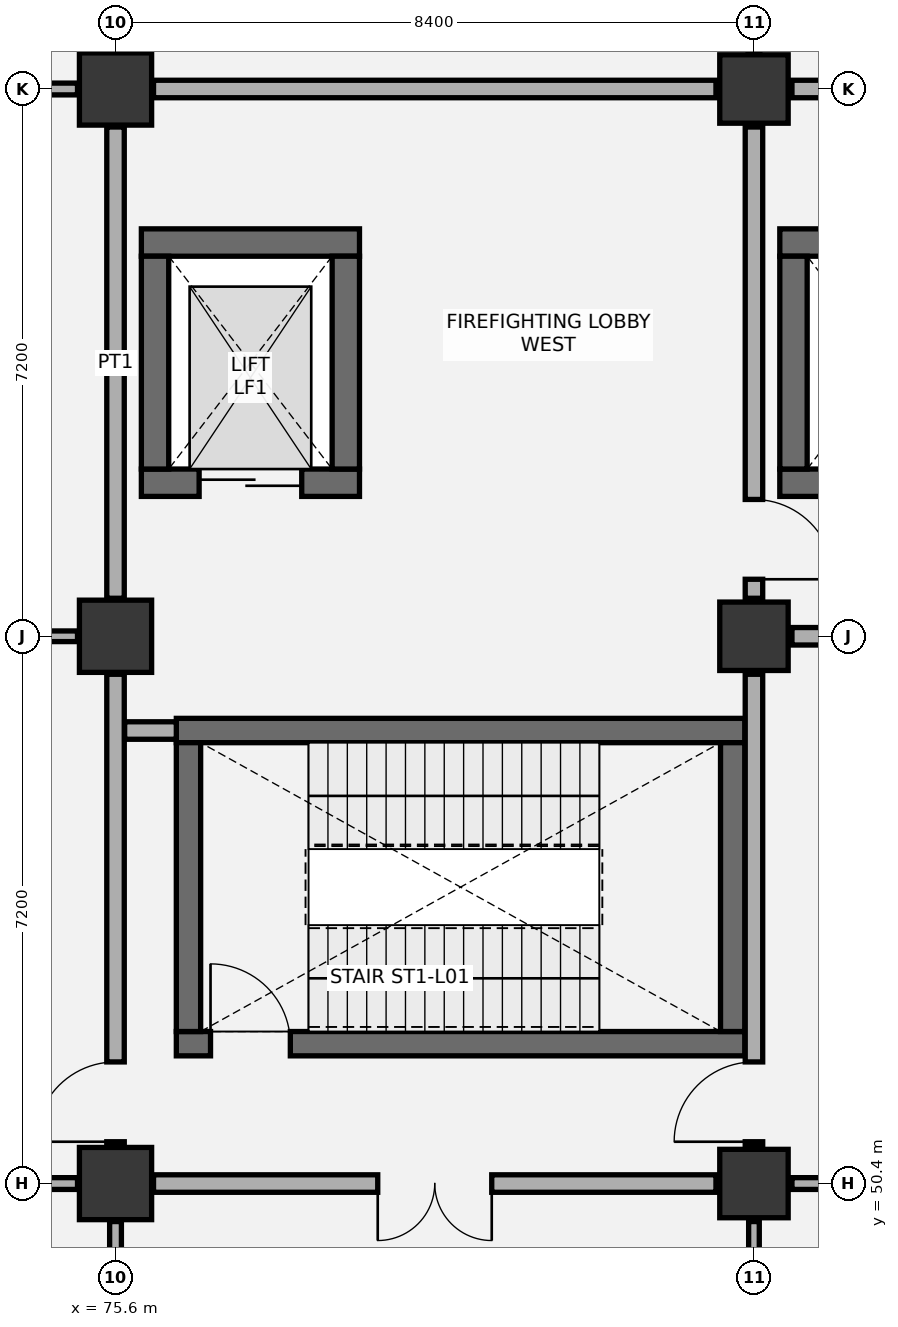
"""IFC4 building model, lengths in metres.
Left out: names, types, materials, properties, quantities, classifications, styles, units other than length and angle.
Written with IfcOpenShell. Run it as: python <this file> out.ifc"""

import sys

from ifc_helpers import new_model, si_unit, direction, frame, frame_2d, origin, origin_2d, place, context, subcontext, project, spatial, rectangle, extrude, element, fill, save


model = new_model("IFC4")
c1 = context("Model", 3, precision=1e-05, world=origin(), true_north=direction((0.0, 1.0)))
c2 = subcontext(c1, "Body", "Model", "MODEL_VIEW")
j1 = project(units=[si_unit("LENGTHUNIT", "METRE"), si_unit("PLANEANGLEUNIT", "RADIAN")], contexts=[c1])
p1 = place(None, origin())
s1 = spatial("IfcSite", under=j1, at=p1, CompositionType="ELEMENT")
p2 = place(p1, origin())
s2 = spatial("IfcBuilding", under=s1, at=p2, CompositionType="ELEMENT")
p3 = place(p2, frame((0.0, 0.0, 6.0)))
s3 = spatial("IfcBuildingStorey", under=s2, at=p3, CompositionType="ELEMENT", Elevation=6.0)
for number, where, z_axis, x_axis in (
    (1, (75.6, 50.4, 0.0), (0.0, 0.0, 1.0), (1.0, 0.0, 0.0)),
    (2, (75.6, 57.6, 0.0), (0.0, 0.0, 1.0), (1.0, 0.0, 0.0)),
    (3, (75.6, 64.8, 0.0), (0.0, 0.0, 1.0), (1.0, 0.0, 0.0)),
):
    element("IfcColumn", number, at=place(p3, frame(where, z_axis=z_axis, x_axis=x_axis)), inside=s3, PredefinedType="COLUMN", context=c2, shape_type="SweptSolid", body=[
        extrude(rectangle(XDim=0.95, YDim=0.95, at=origin_2d()), origin(), (0.0, 0.0, 1.0), 5.4),
    ])
for number, where, z_axis, x_axis in (
    (4, (84.0, 50.4, 0.0), (0.0, 0.0, 1.0), (1.0, 0.0, 0.0)),
    (5, (84.0, 57.6, 0.0), (0.0, 0.0, 1.0), (1.0, 0.0, 0.0)),
    (6, (84.0, 64.8, 0.0), (0.0, 0.0, 1.0), (1.0, 0.0, 0.0)),
):
    element("IfcColumn", number, at=place(p3, frame(where, z_axis=z_axis, x_axis=x_axis)), inside=s3, PredefinedType="COLUMN", context=c2, shape_type="SweptSolid", body=[
        extrude(rectangle(XDim=0.9, YDim=0.9, at=origin_2d()), origin(), (0.0, 0.0, 1.0), 5.4),
    ])
p4 = place(p3, frame((76.4, 52.24, 0.0), z_axis=(0.0, 0.0, 1.0), x_axis=(1.0, 0.0, 0.0)))
e7 = element("IfcWall", 7, at=p4, inside=s3, PredefinedType="SHEAR", context=c2, shape_type="SweptSolid", body=[
    extrude(rectangle(XDim=7.48, YDim=0.32, at=frame_2d((3.74, 0.0))), origin(), (0.0, 0.0, 1.0), 5.075),
])
p5 = place(p4, frame((0.45, 0.0, 0.0)))
e8 = element("IfcOpeningElement", 8, at=p5, cuts=e7, PredefinedType="OPENING", context=c2, shape_type="SweptSolid", body=[
    extrude(rectangle(XDim=1.05, YDim=2.15, at=frame_2d((0.525, 1.075))), frame((0.0, 0.17, 0.0), z_axis=(0.0, -1.0, 0.0), x_axis=(1.0, 0.0, 0.0)), (0.0, 0.0, 1.0), 0.34),
])
p6 = place(p3, frame((76.4, 56.36, 0.0), z_axis=(0.0, 0.0, 1.0), x_axis=(1.0, 0.0, 0.0)))
e9 = element("IfcWall", 9, at=p6, inside=s3, PredefinedType="SHEAR", context=c2, shape_type="SweptSolid", body=[
    extrude(rectangle(XDim=7.48, YDim=0.32, at=frame_2d((3.74, 0.0))), origin(), (0.0, 0.0, 1.0), 5.075),
])
for number, where, z_axis, x_axis in (
    (10, (76.56, 52.4, 0.0), (0.0, 0.0, 1.0), (0.0, 1.0, 0.0)),
    (11, (83.72, 52.4, 0.0), (0.0, 0.0, 1.0), (0.0, 1.0, 0.0)),
):
    element("IfcWall", number, at=place(p3, frame(where, z_axis=z_axis, x_axis=x_axis)), inside=s3, PredefinedType="SHEAR", context=c2, shape_type="SweptSolid", body=[
        extrude(rectangle(XDim=3.8, YDim=0.32, at=frame_2d((1.9, 0.0))), origin(), (0.0, 0.0, 1.0), 5.075),
    ])
p7 = place(p3, frame((75.94, 62.78, 0.0), z_axis=(0.0, 0.0, 1.0), x_axis=(1.0, 0.0, 0.0)))
e12 = element("IfcWall", 12, at=p7, inside=s3, PredefinedType="SHEAR", context=c2, shape_type="SweptSolid", body=[
    extrude(rectangle(XDim=2.87, YDim=0.36, at=frame_2d((1.435, 0.0))), origin(), (0.0, 0.0, 1.0), 5.075),
])
p8 = place(p3, frame((75.94, 59.62, 0.0), z_axis=(0.0, 0.0, 1.0), x_axis=(1.0, 0.0, 0.0)))
e13 = element("IfcWall", 13, at=p8, inside=s3, PredefinedType="SHEAR", context=c2, shape_type="SweptSolid", body=[
    extrude(rectangle(XDim=2.87, YDim=0.36, at=frame_2d((1.435, 0.0))), origin(), (0.0, 0.0, 1.0), 5.075),
])
p9 = place(p8, frame((0.76, 0.0, 0.0)))
e14 = element("IfcOpeningElement", 14, at=p9, cuts=e13, PredefinedType="OPENING", context=c2, shape_type="SweptSolid", body=[
    extrude(rectangle(XDim=1.35, YDim=2.2, at=frame_2d((0.675, 1.1))), frame((0.0, 0.19, 0.0), z_axis=(0.0, -1.0, 0.0), x_axis=(1.0, 0.0, 0.0)), (0.0, 0.0, 1.0), 0.38),
])
for number, where, z_axis, x_axis in (
    (15, (76.12, 59.8, 0.0), (0.0, 0.0, 1.0), (0.0, 1.0, 0.0)),
    (16, (78.63, 59.8, 0.0), (0.0, 0.0, 1.0), (0.0, 1.0, 0.0)),
):
    element("IfcWall", number, at=place(p3, frame(where, z_axis=z_axis, x_axis=x_axis)), inside=s3, PredefinedType="SHEAR", context=c2, shape_type="SweptSolid", body=[
        extrude(rectangle(XDim=2.8, YDim=0.36, at=frame_2d((1.4, 0.0))), origin(), (0.0, 0.0, 1.0), 5.075),
    ])
p10 = place(p3, frame((84.34, 62.78, 0.0), z_axis=(0.0, 0.0, 1.0), x_axis=(1.0, 0.0, 0.0)))
e17 = element("IfcWall", 17, at=p10, inside=s3, PredefinedType="SHEAR", context=c2, shape_type="SweptSolid", body=[
    extrude(rectangle(XDim=7.77, YDim=0.36, at=frame_2d((3.885, 0.0))), origin(), (0.0, 0.0, 1.0), 5.075),
])
p11 = place(p3, frame((84.34, 59.62, 0.0), z_axis=(0.0, 0.0, 1.0), x_axis=(1.0, 0.0, 0.0)))
e18 = element("IfcWall", 18, at=p11, inside=s3, PredefinedType="SHEAR", context=c2, shape_type="SweptSolid", body=[
    extrude(rectangle(XDim=2.66, YDim=0.36, at=frame_2d((1.33, 0.0))), origin(), (0.0, 0.0, 1.0), 5.075),
])
p12 = place(p11, frame((0.78, 0.0, 0.0)))
e19 = element("IfcOpeningElement", 19, at=p12, cuts=e18, PredefinedType="OPENING", context=c2, shape_type="SweptSolid", body=[
    extrude(rectangle(XDim=1.1, YDim=2.15, at=frame_2d((0.55, 1.075))), frame((0.0, 0.19, 0.0), z_axis=(0.0, -1.0, 0.0), x_axis=(1.0, 0.0, 0.0)), (0.0, 0.0, 1.0), 0.38),
])
p13 = place(p3, frame((84.52, 59.8, 0.0), z_axis=(0.0, 0.0, 1.0), x_axis=(0.0, 1.0, 0.0)))
e20 = element("IfcWall", 20, at=p13, inside=s3, PredefinedType="SHEAR", context=c2, shape_type="SweptSolid", body=[
    extrude(rectangle(XDim=2.8, YDim=0.36, at=frame_2d((1.4, 0.0))), origin(), (0.0, 0.0, 1.0), 5.075),
])
p14 = place(p3, frame((75.6, 43.7, 0.0), z_axis=(0.0, 0.0, 1.0), x_axis=(0.0, 1.0, 0.0)))
e21 = element("IfcWall", 21, at=p14, inside=s3, PredefinedType="PARTITIONING", context=c2, shape_type="SweptSolid", body=[
    extrude(rectangle(XDim=6.2, YDim=0.155, at=frame_2d((3.1, 0.0))), origin(), (0.0, 0.0, 1.0), 4.57),
])
p15 = place(p14, frame((2.4, 0.0, 0.0)))
e22 = element("IfcOpeningElement", 22, at=p15, cuts=e21, PredefinedType="OPENING", context=c2, shape_type="SweptSolid", body=[
    extrude(rectangle(XDim=1.4, YDim=2.15, at=frame_2d((0.7, 1.075))), frame((0.0, 0.087, 0.0), z_axis=(0.0, -1.0, 0.0), x_axis=(1.0, 0.0, 0.0)), (0.0, 0.0, 1.0), 0.175),
])
p16 = place(p3, frame((67.7, 50.4, 0.0), z_axis=(0.0, 0.0, 1.0), x_axis=(1.0, 0.0, 0.0)))
e23 = element("IfcWall", 23, at=p16, inside=s3, PredefinedType="PARTITIONING", context=c2, shape_type="SweptSolid", body=[
    extrude(rectangle(XDim=7.4, YDim=0.155, at=frame_2d((3.7, 0.0))), origin(), (0.0, 0.0, 1.0), 4.27),
])
p17 = place(p16, frame((2.85, 0.0, 0.0)))
e24 = element("IfcOpeningElement", 24, at=p17, cuts=e23, PredefinedType="OPENING", context=c2, shape_type="SweptSolid", body=[
    extrude(rectangle(XDim=1.7, YDim=2.25, at=frame_2d((0.85, 1.125))), frame((0.0, 0.087, 0.0), z_axis=(0.0, -1.0, 0.0), x_axis=(1.0, 0.0, 0.0)), (0.0, 0.0, 1.0), 0.175),
])
p18 = place(p3, frame((75.6, 50.9, 0.0), z_axis=(0.0, 0.0, 1.0), x_axis=(0.0, 1.0, 0.0)))
e25 = element("IfcWall", 25, at=p18, inside=s3, PredefinedType="PARTITIONING", context=c2, shape_type="SweptSolid", body=[
    extrude(rectangle(XDim=6.2, YDim=0.23, at=frame_2d((3.1, 0.0))), origin(), (0.0, 0.0, 1.0), 4.32),
])
p19 = place(p18, frame((0.05, 0.0, 0.0)))
e26 = element("IfcOpeningElement", 26, at=p19, cuts=e25, PredefinedType="OPENING", context=c2, shape_type="SweptSolid", body=[
    extrude(rectangle(XDim=1.05, YDim=2.15, at=frame_2d((0.525, 1.075))), frame((0.0, 0.125, 0.0), z_axis=(0.0, -1.0, 0.0), x_axis=(1.0, 0.0, 0.0)), (0.0, 0.0, 1.0), 0.25),
])
p20 = place(p3, frame((67.7, 57.6, 0.0), z_axis=(0.0, 0.0, 1.0), x_axis=(1.0, 0.0, 0.0)))
e27 = element("IfcWall", 27, at=p20, inside=s3, PredefinedType="PARTITIONING", context=c2, shape_type="SweptSolid", body=[
    extrude(rectangle(XDim=7.4, YDim=0.14, at=frame_2d((3.7, 0.0))), origin(), (0.0, 0.0, 1.0), 4.27),
])
p21 = place(p20, frame((2.85, 0.0, 0.0)))
e28 = element("IfcOpeningElement", 28, at=p21, cuts=e27, PredefinedType="OPENING", context=c2, shape_type="SweptSolid", body=[
    extrude(rectangle(XDim=1.7, YDim=2.25, at=frame_2d((0.85, 1.125))), frame((0.0, 0.08, 0.0), z_axis=(0.0, -1.0, 0.0), x_axis=(1.0, 0.0, 0.0)), (0.0, 0.0, 1.0), 0.16),
])
p22 = place(p3, frame((75.6, 58.1, 0.0), z_axis=(0.0, 0.0, 1.0), x_axis=(0.0, 1.0, 0.0)))
e29 = element("IfcWall", 29, at=p22, inside=s3, PredefinedType="PARTITIONING", context=c2, shape_type="SweptSolid", body=[
    extrude(rectangle(XDim=6.2, YDim=0.23, at=frame_2d((3.1, 0.0))), origin(), (0.0, 0.0, 1.0), 4.67),
])
p23 = place(p3, frame((67.7, 64.8, 0.0), z_axis=(0.0, 0.0, 1.0), x_axis=(1.0, 0.0, 0.0)))
e30 = element("IfcWall", 30, at=p23, inside=s3, PredefinedType="PARTITIONING", context=c2, shape_type="SweptSolid", body=[
    extrude(rectangle(XDim=7.4, YDim=0.155, at=frame_2d((3.7, 0.0))), origin(), (0.0, 0.0, 1.0), 4.27),
])
p24 = place(p23, frame((3.0, 0.0, 0.0)))
e31 = element("IfcOpeningElement", 31, at=p24, cuts=e30, PredefinedType="OPENING", context=c2, shape_type="SweptSolid", body=[
    extrude(rectangle(XDim=1.4, YDim=2.15, at=frame_2d((0.7, 1.075))), frame((0.0, 0.087, 0.0), z_axis=(0.0, -1.0, 0.0), x_axis=(1.0, 0.0, 0.0)), (0.0, 0.0, 1.0), 0.175),
])
p25 = place(p3, frame((84.0, 43.7, 0.0), z_axis=(0.0, 0.0, 1.0), x_axis=(0.0, 1.0, 0.0)))
e32 = element("IfcWall", 32, at=p25, inside=s3, PredefinedType="PARTITIONING", context=c2, shape_type="SweptSolid", body=[
    extrude(rectangle(XDim=6.2, YDim=0.14, at=frame_2d((3.1, 0.0))), origin(), (0.0, 0.0, 1.0), 4.32),
])
p26 = place(p25, frame((2.4, 0.0, 0.0)))
e33 = element("IfcOpeningElement", 33, at=p26, cuts=e32, PredefinedType="OPENING", context=c2, shape_type="SweptSolid", body=[
    extrude(rectangle(XDim=1.4, YDim=2.15, at=frame_2d((0.7, 1.075))), frame((0.0, 0.08, 0.0), z_axis=(0.0, -1.0, 0.0), x_axis=(1.0, 0.0, 0.0)), (0.0, 0.0, 1.0), 0.16),
])
p27 = place(p3, frame((76.1, 50.4, 0.0), z_axis=(0.0, 0.0, 1.0), x_axis=(1.0, 0.0, 0.0)))
e34 = element("IfcWall", 34, at=p27, inside=s3, PredefinedType="PARTITIONING", context=c2, shape_type="SweptSolid", body=[
    extrude(rectangle(XDim=7.4, YDim=0.23, at=frame_2d((3.7, 0.0))), origin(), (0.0, 0.0, 1.0), 4.27),
])
p28 = place(p27, frame((2.95, 0.0, 0.0)))
e35 = element("IfcOpeningElement", 35, at=p28, cuts=e34, PredefinedType="OPENING", context=c2, shape_type="SweptSolid", body=[
    extrude(rectangle(XDim=1.5, YDim=2.15, at=frame_2d((0.75, 1.075))), frame((0.0, 0.125, 0.0), z_axis=(0.0, -1.0, 0.0), x_axis=(1.0, 0.0, 0.0)), (0.0, 0.0, 1.0), 0.25),
])
p29 = place(p3, frame((84.0, 50.9, 0.0), z_axis=(0.0, 0.0, 1.0), x_axis=(0.0, 1.0, 0.0)))
e36 = element("IfcWall", 36, at=p29, inside=s3, PredefinedType="PARTITIONING", context=c2, shape_type="SweptSolid", body=[
    extrude(rectangle(XDim=6.2, YDim=0.23, at=frame_2d((3.1, 0.0))), origin(), (0.0, 0.0, 1.0), 4.67),
])
p30 = place(p29, frame((0.05, 0.0, 0.0)))
e37 = element("IfcOpeningElement", 37, at=p30, cuts=e36, PredefinedType="OPENING", context=c2, shape_type="SweptSolid", body=[
    extrude(rectangle(XDim=1.05, YDim=2.15, at=frame_2d((0.525, 1.075))), frame((0.0, 0.125, 0.0), z_axis=(0.0, -1.0, 0.0), x_axis=(1.0, 0.0, 0.0)), (0.0, 0.0, 1.0), 0.25),
])
p31 = place(p3, frame((75.72, 56.36, 0.0), z_axis=(0.0, 0.0, 1.0), x_axis=(1.0, 0.0, 0.0)))
e38 = element("IfcWall", 38, at=p31, inside=s3, PredefinedType="PARTITIONING", context=c2, shape_type="SweptSolid", body=[
    extrude(rectangle(XDim=0.68, YDim=0.23, at=frame_2d((0.34, 0.0))), origin(), (0.0, 0.0, 1.0), 5.075),
])
p32 = place(p3, frame((84.0, 58.1, 0.0), z_axis=(0.0, 0.0, 1.0), x_axis=(0.0, 1.0, 0.0)))
e39 = element("IfcWall", 39, at=p32, inside=s3, PredefinedType="PARTITIONING", context=c2, shape_type="SweptSolid", body=[
    extrude(rectangle(XDim=6.2, YDim=0.23, at=frame_2d((3.1, 0.0))), origin(), (0.0, 0.0, 1.0), 4.32),
])
p33 = place(p32, frame((0.25, 0.0, 0.0)))
e40 = element("IfcOpeningElement", 40, at=p33, cuts=e39, PredefinedType="OPENING", context=c2, shape_type="SweptSolid", body=[
    extrude(rectangle(XDim=1.05, YDim=2.15, at=frame_2d((0.525, 1.075))), frame((0.0, 0.125, 0.0), z_axis=(0.0, -1.0, 0.0), x_axis=(1.0, 0.0, 0.0)), (0.0, 0.0, 1.0), 0.25),
])
p34 = place(p3, frame((76.1, 64.8, 0.0), z_axis=(0.0, 0.0, 1.0), x_axis=(1.0, 0.0, 0.0)))
e41 = element("IfcWall", 41, at=p34, inside=s3, PredefinedType="PARTITIONING", context=c2, shape_type="SweptSolid", body=[
    extrude(rectangle(XDim=7.4, YDim=0.23, at=frame_2d((3.7, 0.0))), origin(), (0.0, 0.0, 1.0), 4.27),
])
p35 = place(p3, frame((84.5, 50.4, 0.0), z_axis=(0.0, 0.0, 1.0), x_axis=(1.0, 0.0, 0.0)))
e42 = element("IfcWall", 42, at=p35, inside=s3, PredefinedType="PARTITIONING", context=c2, shape_type="SweptSolid", body=[
    extrude(rectangle(XDim=7.4, YDim=0.155, at=frame_2d((3.7, 0.0))), origin(), (0.0, 0.0, 1.0), 4.27),
])
p36 = place(p35, frame((3.0, 0.0, 0.0)))
e43 = element("IfcOpeningElement", 43, at=p36, cuts=e42, PredefinedType="OPENING", context=c2, shape_type="SweptSolid", body=[
    extrude(rectangle(XDim=1.4, YDim=2.15, at=frame_2d((0.7, 1.075))), frame((0.0, 0.087, 0.0), z_axis=(0.0, -1.0, 0.0), x_axis=(1.0, 0.0, 0.0)), (0.0, 0.0, 1.0), 0.175),
])
p37 = place(p3, frame((84.5, 57.6, 0.0), z_axis=(0.0, 0.0, 1.0), x_axis=(1.0, 0.0, 0.0)))
e44 = element("IfcWall", 44, at=p37, inside=s3, PredefinedType="PARTITIONING", context=c2, shape_type="SweptSolid", body=[
    extrude(rectangle(XDim=7.4, YDim=0.23, at=frame_2d((3.7, 0.0))), origin(), (0.0, 0.0, 1.0), 4.27),
])
p38 = place(p37, frame((2.95, 0.0, 0.0)))
e45 = element("IfcOpeningElement", 45, at=p38, cuts=e44, PredefinedType="OPENING", context=c2, shape_type="SweptSolid", body=[
    extrude(rectangle(XDim=1.5, YDim=2.15, at=frame_2d((0.75, 1.075))), frame((0.0, 0.125, 0.0), z_axis=(0.0, -1.0, 0.0), x_axis=(1.0, 0.0, 0.0)), (0.0, 0.0, 1.0), 0.25),
])
p39 = place(p3, frame((84.5, 64.8, 0.0), z_axis=(0.0, 0.0, 1.0), x_axis=(1.0, 0.0, 0.0)))
e46 = element("IfcWall", 46, at=p39, inside=s3, PredefinedType="PARTITIONING", context=c2, shape_type="SweptSolid", body=[
    extrude(rectangle(XDim=7.4, YDim=0.23, at=frame_2d((3.7, 0.0))), origin(), (0.0, 0.0, 1.0), 4.27),
])
p40 = place(p5, origin())
e47 = element("IfcDoor", 47, at=p40, inside=s3, OperationType="SINGLE_SWING_LEFT", PredefinedType="DOOR", context=c2, shape_type="SweptSolid", body=[
    extrude(rectangle(XDim=1.05, YDim=2.15, at=frame_2d((0.525, 1.075))), frame((0.0, 0.025, 0.0), z_axis=(0.0, -1.0, 0.0), x_axis=(1.0, 0.0, 0.0)), (0.0, 0.0, 1.0), 0.05),
])
fill(e8, e47)
p41 = place(p9, origin())
e48 = element("IfcDoor", 48, at=p41, inside=s3, OperationType="DOUBLE_DOOR_SLIDING", PredefinedType="DOOR", context=c2, shape_type="SweptSolid", body=[
    extrude(rectangle(XDim=1.35, YDim=2.2, at=frame_2d((0.675, 1.1))), frame((0.0, 0.025, 0.0), z_axis=(0.0, -1.0, 0.0), x_axis=(1.0, 0.0, 0.0)), (0.0, 0.0, 1.0), 0.05),
])
fill(e14, e48)
p42 = place(p19, origin())
e49 = element("IfcDoor", 49, at=p42, inside=s3, OperationType="SINGLE_SWING_LEFT", PredefinedType="DOOR", context=c2, shape_type="SweptSolid", body=[
    extrude(rectangle(XDim=1.05, YDim=2.15, at=frame_2d((0.525, 1.075))), frame((0.0, 0.025, 0.0), z_axis=(0.0, -1.0, 0.0), x_axis=(1.0, 0.0, 0.0)), (0.0, 0.0, 1.0), 0.05),
])
fill(e26, e49)
p43 = place(p28, frame((1.5, 0.0, 0.0), z_axis=(0.0, 0.0, 1.0), x_axis=(-1.0, 0.0, 0.0)))
e50 = element("IfcDoor", 50, at=p43, inside=s3, OperationType="DOUBLE_DOOR_SINGLE_SWING", PredefinedType="DOOR", context=c2, shape_type="SweptSolid", body=[
    extrude(rectangle(XDim=1.5, YDim=2.15, at=frame_2d((0.75, 1.075))), frame((0.0, 0.025, 0.0), z_axis=(0.0, -1.0, 0.0), x_axis=(1.0, 0.0, 0.0)), (0.0, 0.0, 1.0), 0.05),
])
fill(e35, e50)
p44 = place(p30, origin())
e51 = element("IfcDoor", 51, at=p44, inside=s3, OperationType="SINGLE_SWING_LEFT", PredefinedType="DOOR", context=c2, shape_type="SweptSolid", body=[
    extrude(rectangle(XDim=1.05, YDim=2.15, at=frame_2d((0.525, 1.075))), frame((0.0, 0.025, 0.0), z_axis=(0.0, -1.0, 0.0), x_axis=(1.0, 0.0, 0.0)), (0.0, 0.0, 1.0), 0.05),
])
fill(e37, e51)
p45 = place(p33, frame((1.05, 0.0, 0.0), z_axis=(0.0, 0.0, 1.0), x_axis=(-1.0, 0.0, 0.0)))
e52 = element("IfcDoor", 52, at=p45, inside=s3, OperationType="SINGLE_SWING_RIGHT", PredefinedType="DOOR", context=c2, shape_type="SweptSolid", body=[
    extrude(rectangle(XDim=1.05, YDim=2.15, at=frame_2d((0.525, 1.075))), frame((0.0, 0.025, 0.0), z_axis=(0.0, -1.0, 0.0), x_axis=(1.0, 0.0, 0.0)), (0.0, 0.0, 1.0), 0.05),
])
fill(e40, e52)
save(model, sys.argv[1])
